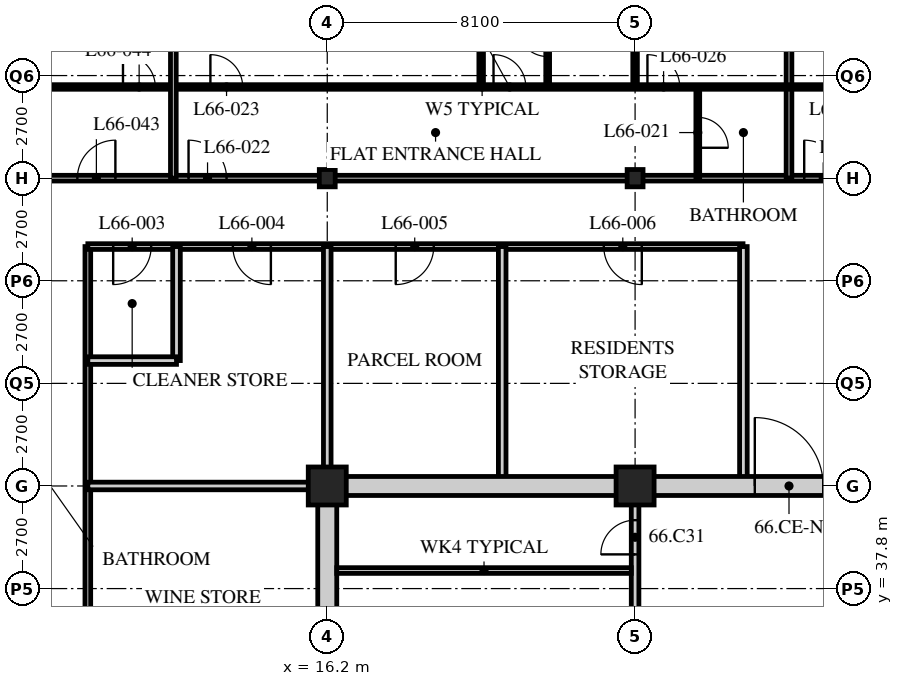
"""IFC4 building model, lengths in metres.
Left out: names, types, materials, properties, quantities, classifications, styles, units other than length and angle.
Written with IfcOpenShell. Run it as: python <this file> out.ifc"""

import sys

from ifc_helpers import new_model, si_unit, direction, frame, frame_2d, origin, origin_2d, place, context, subcontext, project, spatial, rectangle, hollow_rectangle, i_section, extrude, element, fill, save


model = new_model("IFC4")
c1 = context("Model", 3, precision=1e-05, world=origin(), true_north=direction((0.0, 1.0)))
c2 = subcontext(c1, "Body", "Model", "MODEL_VIEW")
j1 = project(units=[si_unit("LENGTHUNIT", "METRE"), si_unit("PLANEANGLEUNIT", "RADIAN")], contexts=[c1])
p1 = place(None, origin())
s1 = spatial("IfcSite", under=j1, at=p1, CompositionType="ELEMENT")
p2 = place(p1, origin())
s2 = spatial("IfcBuilding", under=s1, at=p2, CompositionType="ELEMENT")
p3 = place(p2, frame((0.0, 0.0, 258.0)))
s3 = spatial("IfcBuildingStorey", under=s2, at=p3, CompositionType="ELEMENT", Elevation=258.0)
p4 = place(p3, frame((16.2, 40.5, 0.0), z_axis=(0.0, 0.0, 1.0), x_axis=(1.0, 0.0, 0.0)))
e1 = element("IfcColumn", 1, at=p4, inside=s3, PredefinedType="COLUMN", context=c2, shape_type="SweptSolid", body=[
    extrude(hollow_rectangle(XDim=1.0, YDim=1.0, WallThickness=0.1, at=origin_2d()), origin(), (0.0, 0.0, 1.0), 3.9),
])
p5 = place(p3, frame((16.2, 48.6, 0.0), z_axis=(0.0, 0.0, 1.0), x_axis=(1.0, 0.0, 0.0)))
e2 = element("IfcColumn", 2, at=p5, inside=s3, PredefinedType="COLUMN", context=c2, shape_type="SweptSolid", body=[
    extrude(i_section(OverallWidth=0.418, OverallDepth=0.456, WebThickness=0.042, FlangeThickness=0.067, FilletRadius=0.015, at=origin_2d()), origin(), (0.0, 0.0, 1.0), 3.9),
])
p6 = place(p3, frame((24.3, 40.5, 0.0), z_axis=(0.0, 0.0, 1.0), x_axis=(1.0, 0.0, 0.0)))
e3 = element("IfcColumn", 3, at=p6, inside=s3, PredefinedType="COLUMN", context=c2, shape_type="SweptSolid", body=[
    extrude(hollow_rectangle(XDim=1.0, YDim=1.0, WallThickness=0.1, at=origin_2d()), origin(), (0.0, 0.0, 1.0), 3.9),
])
p7 = place(p3, frame((24.3, 48.6, 0.0), z_axis=(0.0, 0.0, 1.0), x_axis=(1.0, 0.0, 0.0)))
e4 = element("IfcColumn", 4, at=p7, inside=s3, PredefinedType="COLUMN", context=c2, shape_type="SweptSolid", body=[
    extrude(i_section(OverallWidth=0.418, OverallDepth=0.456, WebThickness=0.042, FlangeThickness=0.067, FilletRadius=0.015, at=origin_2d()), origin(), (0.0, 0.0, 1.0), 3.9),
])
p8 = place(p3, frame((8.1, 48.6, 0.0), z_axis=(0.0, 0.0, 1.0), x_axis=(1.0, 0.0, 0.0)))
e5 = element("IfcWall", 5, at=p8, inside=s3, PredefinedType="PARTITIONING", context=c2, shape_type="SweptSolid", body=[
    extrude(rectangle(XDim=28.35, YDim=0.15, at=frame_2d((14.175, 0.0))), origin(), (0.0, 0.0, 1.0), 3.078),
])
p9 = place(p8, frame((4.45, 0.0, 0.0)))
e6 = element("IfcOpeningElement", 6, at=p9, cuts=e5, PredefinedType="OPENING", context=c2, shape_type="SweptSolid", body=[
    extrude(rectangle(XDim=1.0, YDim=2.1, at=frame_2d((0.5, 1.05))), frame((0.0, 0.085, 0.0), z_axis=(0.0, -1.0, 0.0), x_axis=(1.0, 0.0, 0.0)), (0.0, 0.0, 1.0), 0.17),
])
p10 = place(p8, frame((20.65, 0.0, 0.0)))
e7 = element("IfcOpeningElement", 7, at=p10, cuts=e5, PredefinedType="OPENING", context=c2, shape_type="SweptSolid", body=[
    extrude(rectangle(XDim=1.0, YDim=2.1, at=frame_2d((0.5, 1.05))), frame((0.0, 0.085, 0.0), z_axis=(0.0, -1.0, 0.0), x_axis=(1.0, 0.0, 0.0)), (0.0, 0.0, 1.0), 0.17),
])
p11 = place(p8, frame((1.525, 0.0, 0.0)))
e8 = element("IfcOpeningElement", 8, at=p11, cuts=e5, PredefinedType="OPENING", context=c2, shape_type="SweptSolid", body=[
    extrude(rectangle(XDim=1.0, YDim=2.1, at=frame_2d((0.5, 1.05))), frame((0.0, 0.085, 0.0), z_axis=(0.0, -1.0, 0.0), x_axis=(1.0, 0.0, 0.0)), (0.0, 0.0, 1.0), 0.17),
])
p12 = place(p3, frame((9.9, 24.3, 0.0), z_axis=(0.0, 0.0, 1.0), x_axis=(0.0, 1.0, 0.0)))
e9 = element("IfcWall", 9, at=p12, inside=s3, PredefinedType="PARTITIONING", context=c2, shape_type="SweptSolid", body=[
    extrude(rectangle(XDim=22.5, YDim=0.15, at=frame_2d((11.25, 0.0))), origin(), (0.0, 0.0, 1.0), 3.69),
])
p13 = place(p12, frame((3.55, 0.0, 0.0)))
e10 = element("IfcOpeningElement", 10, at=p13, cuts=e9, PredefinedType="OPENING", context=c2, shape_type="SweptSolid", body=[
    extrude(rectangle(XDim=1.0, YDim=2.1, at=frame_2d((0.5, 1.05))), frame((0.0, 0.085, 0.0), z_axis=(0.0, -1.0, 0.0), x_axis=(1.0, 0.0, 0.0)), (0.0, 0.0, 1.0), 0.17),
])
p14 = place(p12, frame((11.65, 0.0, 0.0)))
e11 = element("IfcOpeningElement", 11, at=p14, cuts=e9, PredefinedType="OPENING", context=c2, shape_type="SweptSolid", body=[
    extrude(rectangle(XDim=1.0, YDim=2.1, at=frame_2d((0.5, 1.05))), frame((0.0, 0.085, 0.0), z_axis=(0.0, -1.0, 0.0), x_axis=(1.0, 0.0, 0.0)), (0.0, 0.0, 1.0), 0.17),
])
p15 = place(p3, frame((9.9, 46.8, 0.0), z_axis=(0.0, 0.0, 1.0), x_axis=(1.0, 0.0, 0.0)))
e12 = element("IfcWall", 12, at=p15, inside=s3, PredefinedType="PARTITIONING", context=c2, shape_type="SweptSolid", body=[
    extrude(rectangle(XDim=17.24, YDim=0.15, at=frame_2d((8.62, 0.0))), origin(), (0.0, 0.0, 1.0), 3.69),
])
p16 = place(p15, frame((0.667, 0.0, 0.0)))
e13 = element("IfcOpeningElement", 13, at=p16, cuts=e12, PredefinedType="OPENING", context=c2, shape_type="SweptSolid", body=[
    extrude(rectangle(XDim=1.0, YDim=2.1, at=frame_2d((0.5, 1.05))), frame((0.0, 0.085, 0.0), z_axis=(0.0, -1.0, 0.0), x_axis=(1.0, 0.0, 0.0)), (0.0, 0.0, 1.0), 0.17),
])
p17 = place(p15, frame((3.817, 0.0, 0.0)))
e14 = element("IfcOpeningElement", 14, at=p17, cuts=e12, PredefinedType="OPENING", context=c2, shape_type="SweptSolid", body=[
    extrude(rectangle(XDim=1.0, YDim=2.1, at=frame_2d((0.5, 1.05))), frame((0.0, 0.085, 0.0), z_axis=(0.0, -1.0, 0.0), x_axis=(1.0, 0.0, 0.0)), (0.0, 0.0, 1.0), 0.17),
])
p18 = place(p15, frame((8.102, 0.0, 0.0)))
e15 = element("IfcOpeningElement", 15, at=p18, cuts=e12, PredefinedType="OPENING", context=c2, shape_type="SweptSolid", body=[
    extrude(rectangle(XDim=1.0, YDim=2.1, at=frame_2d((0.5, 1.05))), frame((0.0, 0.085, 0.0), z_axis=(0.0, -1.0, 0.0), x_axis=(1.0, 0.0, 0.0)), (0.0, 0.0, 1.0), 0.17),
])
p19 = place(p15, frame((13.577, 0.0, 0.0)))
e16 = element("IfcOpeningElement", 16, at=p19, cuts=e12, PredefinedType="OPENING", context=c2, shape_type="SweptSolid", body=[
    extrude(rectangle(XDim=1.0, YDim=2.1, at=frame_2d((0.5, 1.05))), frame((0.0, 0.085, 0.0), z_axis=(0.0, -1.0, 0.0), x_axis=(1.0, 0.0, 0.0)), (0.0, 0.0, 1.0), 0.17),
])
p20 = place(p3, frame((16.2, 40.5, 0.0), z_axis=(0.0, 0.0, 1.0), x_axis=(0.0, 1.0, 0.0)))
e17 = element("IfcWall", 17, at=p20, inside=s3, PredefinedType="SOLIDWALL", context=c2, shape_type="SweptSolid", body=[
    extrude(rectangle(XDim=6.3, YDim=0.2, at=frame_2d((3.15, 0.0))), origin(), (0.0, 0.0, 1.0), 3.078),
])
p21 = place(p3, frame((12.233, 46.8, 0.0), z_axis=(0.0, 0.0, 1.0), x_axis=(0.0, -1.0, 0.0)))
e18 = element("IfcWall", 18, at=p21, inside=s3, PredefinedType="SOLIDWALL", context=c2, shape_type="SweptSolid", body=[
    extrude(rectangle(XDim=3.0, YDim=0.2, at=frame_2d((1.5, 0.0))), origin(), (0.0, 0.0, 1.0), 3.69),
])
p22 = place(p3, frame((9.9, 43.8, 0.0), z_axis=(0.0, 0.0, 1.0), x_axis=(1.0, 0.0, 0.0)))
e19 = element("IfcWall", 19, at=p22, inside=s3, PredefinedType="SOLIDWALL", context=c2, shape_type="SweptSolid", body=[
    extrude(rectangle(XDim=2.333, YDim=0.2, at=frame_2d((1.167, 0.0))), origin(), (0.0, 0.0, 1.0), 3.69),
])
for number, where, z_axis, x_axis in (
    (20, (20.803, 46.8, 0.0), (0.0, 0.0, 1.0), (0.0, -1.0, 0.0)),
    (21, (27.15, 40.5, 0.0), (0.0, 0.0, 1.0), (0.0, 1.0, 0.0)),
):
    element("IfcWall", number, at=place(p3, frame(where, z_axis=z_axis, x_axis=x_axis)), inside=s3, PredefinedType="SOLIDWALL", context=c2, shape_type="SweptSolid", body=[
        extrude(rectangle(XDim=6.3, YDim=0.2, at=frame_2d((3.15, 0.0))), origin(), (0.0, 0.0, 1.0), 3.69),
    ])
p23 = place(p3, frame((9.9, 40.5, 0.0), z_axis=(0.0, 0.0, 1.0), x_axis=(1.0, 0.0, 0.0)))
e22 = element("IfcWall", 22, at=p23, inside=s3, PredefinedType="SOLIDWALL", context=c2, shape_type="SweptSolid", body=[
    extrude(rectangle(XDim=6.3, YDim=0.2, at=frame_2d((3.15, 0.0))), origin(), (0.0, 0.0, 1.0), 3.078),
])
p24 = place(p3, frame((25.95, 48.6, 0.0), z_axis=(0.0, 0.0, 1.0), x_axis=(0.0, 1.0, 0.0)))
e23 = element("IfcWall", 23, at=p24, inside=s3, PredefinedType="PARTITIONING", context=c2, shape_type="SweptSolid", body=[
    extrude(rectangle(XDim=2.4, YDim=0.1, at=frame_2d((1.2, 0.0))), origin(), (0.0, 0.0, 1.0), 3.69),
])
p25 = place(p24, frame((0.8, 0.0, 0.0)))
e24 = element("IfcOpeningElement", 24, at=p25, cuts=e23, PredefinedType="OPENING", context=c2, shape_type="SweptSolid", body=[
    extrude(rectangle(XDim=0.8, YDim=2.1, at=frame_2d((0.4, 1.05))), frame((0.0, 0.06, 0.0), z_axis=(0.0, -1.0, 0.0), x_axis=(1.0, 0.0, 0.0)), (0.0, 0.0, 1.0), 0.12),
])
p26 = place(p3, frame((22.0, 51.0, 0.0), z_axis=(0.0, 0.0, 1.0), x_axis=(0.0, 1.0, 0.0)))
e25 = element("IfcWall", 25, at=p26, inside=s3, PredefinedType="PARTITIONING", context=c2, shape_type="SweptSolid", body=[
    extrude(rectangle(XDim=2.4, YDim=0.1, at=frame_2d((1.2, 0.0))), origin(), (0.0, 0.0, 1.0), 3.69),
])
p27 = place(p26, frame((0.8, 0.0, 0.0)))
e26 = element("IfcOpeningElement", 26, at=p27, cuts=e25, PredefinedType="OPENING", context=c2, shape_type="SweptSolid", body=[
    extrude(rectangle(XDim=0.8, YDim=2.1, at=frame_2d((0.4, 1.05))), frame((0.0, 0.06, 0.0), z_axis=(0.0, -1.0, 0.0), x_axis=(1.0, 0.0, 0.0)), (0.0, 0.0, 1.0), 0.12),
])
p28 = place(p3, frame((20.25, 51.0, 0.0), z_axis=(0.0, 0.0, 1.0), x_axis=(0.0, 1.0, 0.0)))
e27 = element("IfcWall", 27, at=p28, inside=s3, PredefinedType="PARTITIONING", context=c2, shape_type="SweptSolid", body=[
    extrude(rectangle(XDim=13.5, YDim=0.12, at=frame_2d((6.75, 0.0))), origin(), (0.0, 0.0, 1.0), 3.69),
])
p29 = place(p3, frame((24.3, 51.0, 0.0), z_axis=(0.0, 0.0, 1.0), x_axis=(0.0, 1.0, 0.0)))
e28 = element("IfcWall", 28, at=p29, inside=s3, PredefinedType="PARTITIONING", context=c2, shape_type="SweptSolid", body=[
    extrude(rectangle(XDim=13.5, YDim=0.12, at=frame_2d((6.75, 0.0))), origin(), (0.0, 0.0, 1.0), 3.078),
])
p30 = place(p3, frame((28.35, 48.6, 0.0), z_axis=(0.0, 0.0, 1.0), x_axis=(0.0, 1.0, 0.0)))
e29 = element("IfcWall", 29, at=p30, inside=s3, PredefinedType="PARTITIONING", context=c2, shape_type="SweptSolid", body=[
    extrude(rectangle(XDim=15.9, YDim=0.15, at=frame_2d((7.95, 0.0))), origin(), (0.0, 0.0, 1.0), 3.69),
])
p31 = place(p3, frame((4.1, 51.0, 0.0), z_axis=(0.0, 0.0, 1.0), x_axis=(1.0, 0.0, 0.0)))
e30 = element("IfcWall", 30, at=p31, inside=s3, PredefinedType="PARTITIONING", context=c2, shape_type="SweptSolid", body=[
    extrude(rectangle(XDim=32.35, YDim=0.12, at=frame_2d((16.175, 0.0))), origin(), (0.0, 0.0, 1.0), 3.69),
])
p32 = place(p31, frame((9.025, 0.0, 0.0)))
e31 = element("IfcOpeningElement", 31, at=p32, cuts=e30, PredefinedType="OPENING", context=c2, shape_type="SweptSolid", body=[
    extrude(rectangle(XDim=0.85, YDim=2.1, at=frame_2d((0.425, 1.05))), frame((0.0, 0.07, 0.0), z_axis=(0.0, -1.0, 0.0), x_axis=(1.0, 0.0, 0.0)), (0.0, 0.0, 1.0), 0.14),
])
p33 = place(p31, frame((16.475, 0.0, 0.0)))
e32 = element("IfcOpeningElement", 32, at=p33, cuts=e30, PredefinedType="OPENING", context=c2, shape_type="SweptSolid", body=[
    extrude(rectangle(XDim=0.85, YDim=2.1, at=frame_2d((0.425, 1.05))), frame((0.0, 0.07, 0.0), z_axis=(0.0, -1.0, 0.0), x_axis=(1.0, 0.0, 0.0)), (0.0, 0.0, 1.0), 0.14),
])
p34 = place(p31, frame((20.525, 0.0, 0.0)))
e33 = element("IfcOpeningElement", 33, at=p34, cuts=e30, PredefinedType="OPENING", context=c2, shape_type="SweptSolid", body=[
    extrude(rectangle(XDim=0.85, YDim=2.1, at=frame_2d((0.425, 1.05))), frame((0.0, 0.07, 0.0), z_axis=(0.0, -1.0, 0.0), x_axis=(1.0, 0.0, 0.0)), (0.0, 0.0, 1.0), 0.14),
])
p35 = place(p31, frame((25.225, 0.0, 0.0)))
e34 = element("IfcOpeningElement", 34, at=p35, cuts=e30, PredefinedType="OPENING", context=c2, shape_type="SweptSolid", body=[
    extrude(rectangle(XDim=0.85, YDim=2.1, at=frame_2d((0.425, 1.05))), frame((0.0, 0.07, 0.0), z_axis=(0.0, -1.0, 0.0), x_axis=(1.0, 0.0, 0.0)), (0.0, 0.0, 1.0), 0.14),
])
p36 = place(p31, frame((28.625, 0.0, 0.0)))
e35 = element("IfcOpeningElement", 35, at=p36, cuts=e30, PredefinedType="OPENING", context=c2, shape_type="SweptSolid", body=[
    extrude(rectangle(XDim=0.85, YDim=2.1, at=frame_2d((0.425, 1.05))), frame((0.0, 0.07, 0.0), z_axis=(0.0, -1.0, 0.0), x_axis=(1.0, 0.0, 0.0)), (0.0, 0.0, 1.0), 0.14),
])
p37 = place(p31, frame((6.725, 0.0, 0.0)))
e36 = element("IfcOpeningElement", 36, at=p37, cuts=e30, PredefinedType="OPENING", context=c2, shape_type="SweptSolid", body=[
    extrude(rectangle(XDim=0.85, YDim=2.1, at=frame_2d((0.425, 1.05))), frame((0.0, 0.07, 0.0), z_axis=(0.0, -1.0, 0.0), x_axis=(1.0, 0.0, 0.0)), (0.0, 0.0, 1.0), 0.14),
])
p38 = place(p31, frame((2.875, 0.0, 0.0)))
e37 = element("IfcOpeningElement", 37, at=p38, cuts=e30, PredefinedType="OPENING", context=c2, shape_type="SweptSolid", body=[
    extrude(rectangle(XDim=0.85, YDim=2.1, at=frame_2d((0.425, 1.05))), frame((0.0, 0.07, 0.0), z_axis=(0.0, -1.0, 0.0), x_axis=(1.0, 0.0, 0.0)), (0.0, 0.0, 1.0), 0.14),
])
p39 = place(p3, frame((12.15, 48.6, 0.0), z_axis=(0.0, 0.0, 1.0), x_axis=(0.0, 1.0, 0.0)))
e38 = element("IfcWall", 38, at=p39, inside=s3, PredefinedType="PARTITIONING", context=c2, shape_type="SweptSolid", body=[
    extrude(rectangle(XDim=15.9, YDim=0.15, at=frame_2d((7.95, 0.0))), origin(), (0.0, 0.0, 1.0), 3.69),
])
p40 = place(p3, frame((15.95, 40.5, 0.0), z_axis=(0.0, 0.0, 1.0), x_axis=(1.0, 0.0, 0.0)))
e39 = element("IfcWall", 39, at=p40, inside=s3, PredefinedType="SOLIDWALL", context=c2, shape_type="SweptSolid", body=[
    extrude(rectangle(XDim=24.55, YDim=0.5, at=frame_2d((12.275, 0.0))), origin(), (0.0, 0.0, 1.0), 3.04),
])
p41 = place(p40, frame((11.5, 0.0, 0.0)))
e40 = element("IfcOpeningElement", 40, at=p41, cuts=e39, PredefinedType="OPENING", context=c2, shape_type="SweptSolid", body=[
    extrude(rectangle(XDim=1.8, YDim=2.4, at=frame_2d((0.9, 1.2))), frame((0.0, 0.26, 0.0), z_axis=(0.0, -1.0, 0.0), x_axis=(1.0, 0.0, 0.0)), (0.0, 0.0, 1.0), 0.52),
])
p42 = place(p3, frame((16.2, 24.55, 0.0), z_axis=(0.0, 0.0, 1.0), x_axis=(0.0, 1.0, 0.0)))
e41 = element("IfcWall", 41, at=p42, inside=s3, PredefinedType="SOLIDWALL", context=c2, shape_type="SweptSolid", body=[
    extrude(rectangle(XDim=15.7, YDim=0.5, at=frame_2d((7.85, 0.0))), origin(), (0.0, 0.0, 1.0), 3.078),
])
p43 = place(p3, frame((24.3, 32.5, 0.0), z_axis=(0.0, 0.0, 1.0), x_axis=(0.0, 1.0, 0.0)))
e42 = element("IfcWall", 42, at=p43, inside=s3, PredefinedType="PARTITIONING", context=c2, shape_type="SweptSolid", body=[
    extrude(rectangle(XDim=7.75, YDim=0.2, at=frame_2d((3.875, 0.0))), origin(), (0.0, 0.0, 1.0), 3.078),
])
p44 = place(p43, frame((2.4, 0.0, 0.0)))
e43 = element("IfcOpeningElement", 43, at=p44, cuts=e42, PredefinedType="OPENING", context=c2, shape_type="SweptSolid", body=[
    extrude(rectangle(XDim=0.9, YDim=2.1, at=frame_2d((0.45, 1.05))), frame((0.0, 0.11, 0.0), z_axis=(0.0, -1.0, 0.0), x_axis=(1.0, 0.0, 0.0)), (0.0, 0.0, 1.0), 0.22),
])
p45 = place(p43, frame((6.2, 0.0, 0.0)))
e44 = element("IfcOpeningElement", 44, at=p45, cuts=e42, PredefinedType="OPENING", context=c2, shape_type="SweptSolid", body=[
    extrude(rectangle(XDim=0.9, YDim=2.1, at=frame_2d((0.45, 1.05))), frame((0.0, 0.11, 0.0), z_axis=(0.0, -1.0, 0.0), x_axis=(1.0, 0.0, 0.0)), (0.0, 0.0, 1.0), 0.22),
])
p46 = place(p3, frame((16.45, 38.275, 0.0), z_axis=(0.0, 0.0, 1.0), x_axis=(1.0, 0.0, 0.0)))
e45 = element("IfcWall", 45, at=p46, inside=s3, PredefinedType="PARTITIONING", context=c2, shape_type="SweptSolid", body=[
    extrude(rectangle(XDim=7.75, YDim=0.15, at=frame_2d((3.875, 0.0))), origin(), (0.0, 0.0, 1.0), 3.69),
])
p47 = place(p16, origin())
e46 = element("IfcDoor", 46, at=p47, inside=s3, OperationType="SINGLE_SWING_RIGHT", PredefinedType="DOOR", context=c2, shape_type="SweptSolid", body=[
    extrude(rectangle(XDim=1.0, YDim=2.1, at=frame_2d((0.5, 1.05))), frame((0.0, 0.025, 0.0), z_axis=(0.0, -1.0, 0.0), x_axis=(1.0, 0.0, 0.0)), (0.0, 0.0, 1.0), 0.05),
])
fill(e13, e46)
p48 = place(p17, origin())
e47 = element("IfcDoor", 47, at=p48, inside=s3, OperationType="SINGLE_SWING_LEFT", PredefinedType="DOOR", context=c2, shape_type="SweptSolid", body=[
    extrude(rectangle(XDim=1.0, YDim=2.1, at=frame_2d((0.5, 1.05))), frame((0.0, 0.025, 0.0), z_axis=(0.0, -1.0, 0.0), x_axis=(1.0, 0.0, 0.0)), (0.0, 0.0, 1.0), 0.05),
])
fill(e14, e47)
p49 = place(p18, origin())
e48 = element("IfcDoor", 48, at=p49, inside=s3, OperationType="SINGLE_SWING_RIGHT", PredefinedType="DOOR", context=c2, shape_type="SweptSolid", body=[
    extrude(rectangle(XDim=1.0, YDim=2.1, at=frame_2d((0.5, 1.05))), frame((0.0, 0.025, 0.0), z_axis=(0.0, -1.0, 0.0), x_axis=(1.0, 0.0, 0.0)), (0.0, 0.0, 1.0), 0.05),
])
fill(e15, e48)
p50 = place(p19, origin())
e49 = element("IfcDoor", 49, at=p50, inside=s3, OperationType="SINGLE_SWING_LEFT", PredefinedType="DOOR", context=c2, shape_type="SweptSolid", body=[
    extrude(rectangle(XDim=1.0, YDim=2.1, at=frame_2d((0.5, 1.05))), frame((0.0, 0.025, 0.0), z_axis=(0.0, -1.0, 0.0), x_axis=(1.0, 0.0, 0.0)), (0.0, 0.0, 1.0), 0.05),
])
fill(e16, e49)
p51 = place(p25, origin())
e50 = element("IfcDoor", 50, at=p51, inside=s3, OperationType="SINGLE_SWING_RIGHT", PredefinedType="DOOR", context=c2, shape_type="SweptSolid", body=[
    extrude(rectangle(XDim=0.8, YDim=2.1, at=frame_2d((0.4, 1.05))), frame((0.0, 0.025, 0.0), z_axis=(0.0, -1.0, 0.0), x_axis=(1.0, 0.0, 0.0)), (0.0, 0.0, 1.0), 0.05),
])
fill(e24, e50)
p52 = place(p9, origin())
e51 = element("IfcDoor", 51, at=p52, inside=s3, OperationType="SINGLE_SWING_LEFT", PredefinedType="DOOR", context=c2, shape_type="SweptSolid", body=[
    extrude(rectangle(XDim=1.0, YDim=2.1, at=frame_2d((0.5, 1.05))), frame((0.0, 0.025, 0.0), z_axis=(0.0, -1.0, 0.0), x_axis=(1.0, 0.0, 0.0)), (0.0, 0.0, 1.0), 0.05),
])
fill(e6, e51)
p53 = place(p32, origin())
e52 = element("IfcDoor", 52, at=p53, inside=s3, OperationType="SINGLE_SWING_LEFT", PredefinedType="DOOR", context=c2, shape_type="SweptSolid", body=[
    extrude(rectangle(XDim=0.85, YDim=2.1, at=frame_2d((0.425, 1.05))), frame((0.0, 0.025, 0.0), z_axis=(0.0, -1.0, 0.0), x_axis=(1.0, 0.0, 0.0)), (0.0, 0.0, 1.0), 0.05),
])
fill(e31, e52)
p54 = place(p27, origin())
e53 = element("IfcDoor", 53, at=p54, inside=s3, OperationType="SINGLE_SWING_RIGHT", PredefinedType="DOOR", context=c2, shape_type="SweptSolid", body=[
    extrude(rectangle(XDim=0.8, YDim=2.1, at=frame_2d((0.4, 1.05))), frame((0.0, 0.025, 0.0), z_axis=(0.0, -1.0, 0.0), x_axis=(1.0, 0.0, 0.0)), (0.0, 0.0, 1.0), 0.05),
])
fill(e26, e53)
p55 = place(p33, origin())
e54 = element("IfcDoor", 54, at=p55, inside=s3, OperationType="SINGLE_SWING_LEFT", PredefinedType="DOOR", context=c2, shape_type="SweptSolid", body=[
    extrude(rectangle(XDim=0.85, YDim=2.1, at=frame_2d((0.425, 1.05))), frame((0.0, 0.025, 0.0), z_axis=(0.0, -1.0, 0.0), x_axis=(1.0, 0.0, 0.0)), (0.0, 0.0, 1.0), 0.05),
])
fill(e32, e54)
p56 = place(p34, origin())
e55 = element("IfcDoor", 55, at=p56, inside=s3, OperationType="SINGLE_SWING_LEFT", PredefinedType="DOOR", context=c2, shape_type="SweptSolid", body=[
    extrude(rectangle(XDim=0.85, YDim=2.1, at=frame_2d((0.425, 1.05))), frame((0.0, 0.025, 0.0), z_axis=(0.0, -1.0, 0.0), x_axis=(1.0, 0.0, 0.0)), (0.0, 0.0, 1.0), 0.05),
])
fill(e33, e55)
p57 = place(p10, origin())
e56 = element("IfcDoor", 56, at=p57, inside=s3, OperationType="SINGLE_SWING_LEFT", PredefinedType="DOOR", context=c2, shape_type="SweptSolid", body=[
    extrude(rectangle(XDim=1.0, YDim=2.1, at=frame_2d((0.5, 1.05))), frame((0.0, 0.025, 0.0), z_axis=(0.0, -1.0, 0.0), x_axis=(1.0, 0.0, 0.0)), (0.0, 0.0, 1.0), 0.05),
])
fill(e7, e56)
p58 = place(p11, origin())
e57 = element("IfcDoor", 57, at=p58, inside=s3, OperationType="SINGLE_SWING_RIGHT", PredefinedType="DOOR", context=c2, shape_type="SweptSolid", body=[
    extrude(rectangle(XDim=1.0, YDim=2.1, at=frame_2d((0.5, 1.05))), frame((0.0, 0.025, 0.0), z_axis=(0.0, -1.0, 0.0), x_axis=(1.0, 0.0, 0.0)), (0.0, 0.0, 1.0), 0.05),
])
fill(e8, e57)
p59 = place(p37, origin())
e58 = element("IfcDoor", 58, at=p59, inside=s3, OperationType="SINGLE_SWING_LEFT", PredefinedType="DOOR", context=c2, shape_type="SweptSolid", body=[
    extrude(rectangle(XDim=0.85, YDim=2.1, at=frame_2d((0.425, 1.05))), frame((0.0, 0.025, 0.0), z_axis=(0.0, -1.0, 0.0), x_axis=(1.0, 0.0, 0.0)), (0.0, 0.0, 1.0), 0.05),
])
fill(e36, e58)
p60 = place(p45, origin())
e59 = element("IfcDoor", 59, at=p60, inside=s3, OperationType="SINGLE_SWING_LEFT", PredefinedType="DOOR", context=c2, shape_type="SweptSolid", body=[
    extrude(rectangle(XDim=0.9, YDim=2.1, at=frame_2d((0.45, 1.05))), frame((0.0, 0.025, 0.0), z_axis=(0.0, -1.0, 0.0), x_axis=(1.0, 0.0, 0.0)), (0.0, 0.0, 1.0), 0.05),
])
fill(e44, e59)
p61 = place(p41, origin())
e60 = element("IfcDoor", 60, at=p61, inside=s3, OperationType="DOUBLE_DOOR_SINGLE_SWING", PredefinedType="DOOR", context=c2, shape_type="SweptSolid", body=[
    extrude(rectangle(XDim=1.8, YDim=2.4, at=frame_2d((0.9, 1.2))), frame((0.0, 0.025, 0.0), z_axis=(0.0, -1.0, 0.0), x_axis=(1.0, 0.0, 0.0)), (0.0, 0.0, 1.0), 0.05),
])
fill(e40, e60)
save(model, sys.argv[1])
